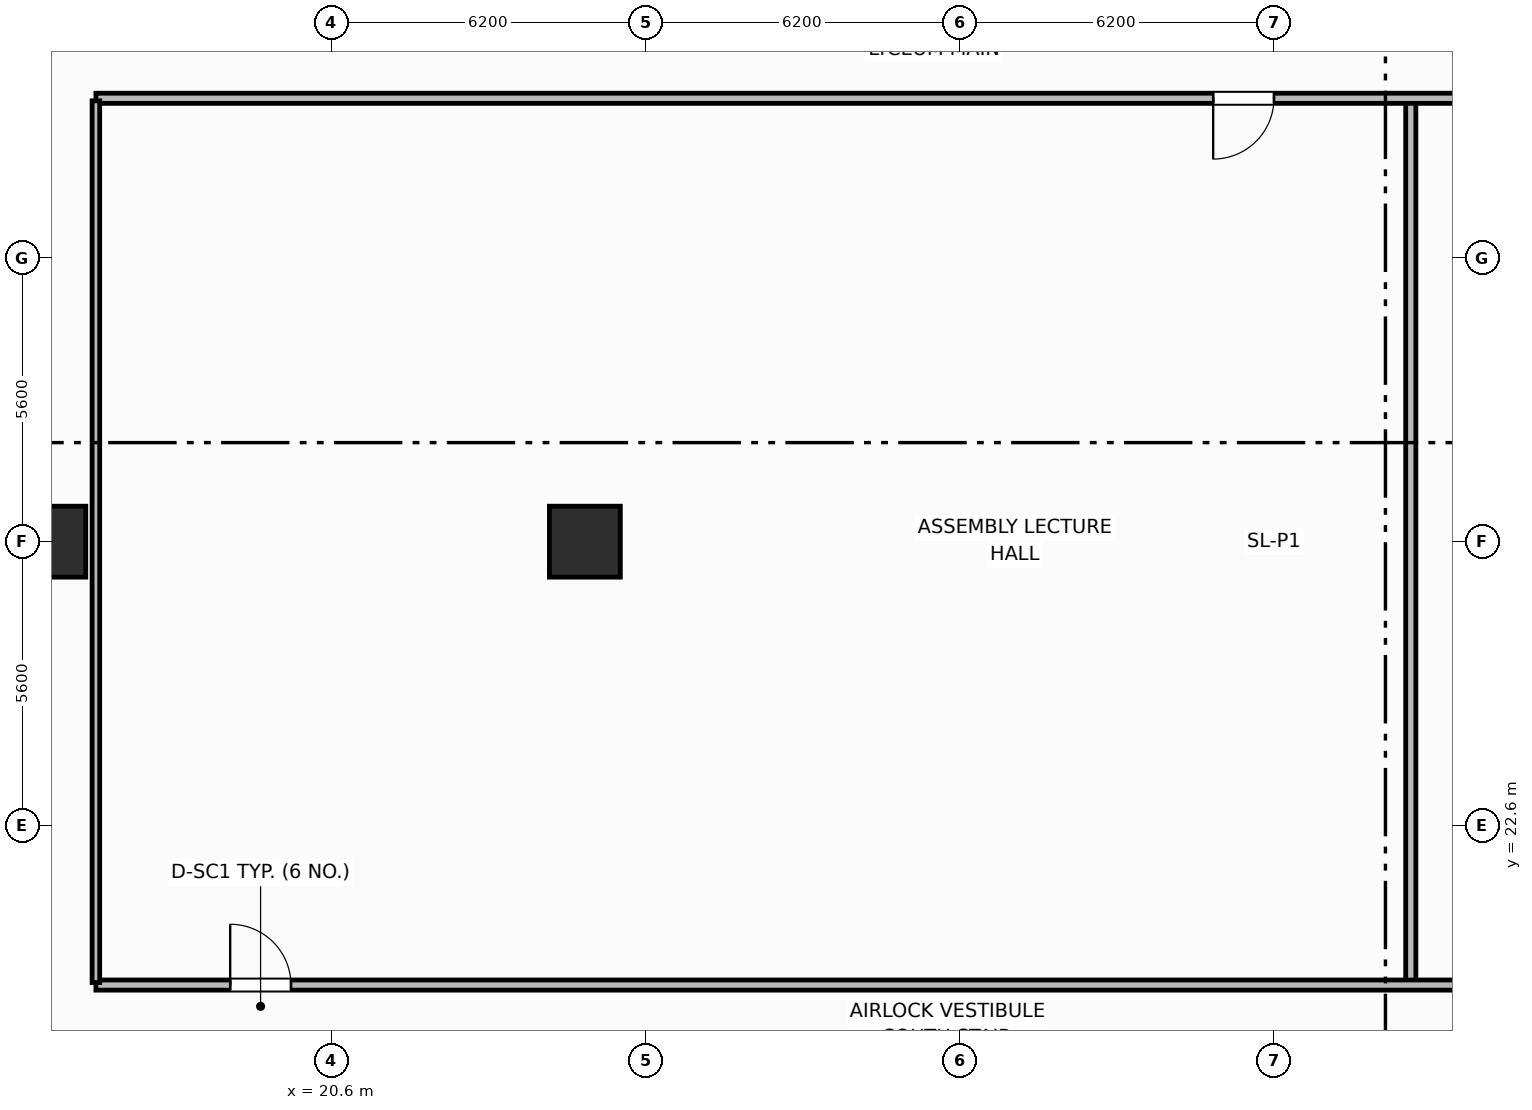
"""IFC4 building model, lengths in metres.
Left out: names, types, materials, properties, quantities, classifications, styles, units other than length and angle.
Written with IfcOpenShell. Run it as: python <this file> out.ifc"""

import sys

from ifc_helpers import new_model, si_unit, direction, frame, frame_2d, origin, origin_2d, place, context, subcontext, project, spatial, rectangle, extrude, element, fill, save


model = new_model("IFC4")
c1 = context("Model", 3, precision=1e-05, world=origin(), true_north=direction((0.0, 1.0)))
c2 = subcontext(c1, "Body", "Model", "MODEL_VIEW")
j1 = project(units=[si_unit("LENGTHUNIT", "METRE"), si_unit("PLANEANGLEUNIT", "RADIAN")], contexts=[c1])
p1 = place(None, origin())
s1 = spatial("IfcSite", under=j1, at=p1, CompositionType="ELEMENT")
p2 = place(p1, origin())
s2 = spatial("IfcBuilding", under=s1, at=p2, CompositionType="ELEMENT")
p3 = place(p2, frame((0.0, 0.0, 11.1)))
s3 = spatial("IfcBuildingStorey", under=s2, at=p3, CompositionType="ELEMENT", Elevation=11.1)
for number, where, z_axis, x_axis in (
    (1, (25.6, 28.2, 0.0), (0.0, 0.0, 1.0), (1.0, 0.0, 0.0)),
    (2, (15.05, 28.2, 0.0), (0.0, 0.0, 1.0), (1.0, 0.0, 0.0)),
):
    element("IfcColumn", number, at=place(p3, frame(where, z_axis=z_axis, x_axis=x_axis)), inside=s3, PredefinedType="COLUMN", context=c2, shape_type="SweptSolid", body=[
        extrude(rectangle(XDim=1.4, YDim=1.4, at=origin_2d()), origin(), (0.0, 0.0, 1.0), 4.5),
    ])
p4 = place(p3, frame((41.9, 19.5, 0.0), z_axis=(0.0, 0.0, 1.0), x_axis=(0.0, 1.0, 0.0)))
e3 = element("IfcWall", 3, at=p4, inside=s3, PredefinedType="PARTITIONING", context=c2, shape_type="SweptSolid", body=[
    extrude(rectangle(XDim=17.4, YDim=0.2, at=frame_2d((8.7, 0.0))), origin(), (0.0, 0.0, 1.0), 3.42),
])
p5 = place(p3, frame((15.95, 19.45, 0.0), z_axis=(0.0, 0.0, 1.0), x_axis=(1.0, 0.0, 0.0)))
e4 = element("IfcWall", 4, at=p5, inside=s3, PredefinedType="PARTITIONING", context=c2, shape_type="SweptSolid", body=[
    extrude(rectangle(XDim=46.5, YDim=0.2, at=frame_2d((23.25, 0.0))), origin(), (0.0, 0.0, 1.0), 3.42),
])
p6 = place(p5, frame((2.65, 0.0, 0.0)))
e5 = element("IfcOpeningElement", 5, at=p6, cuts=e4, PredefinedType="OPENING", context=c2, shape_type="SweptSolid", body=[
    extrude(rectangle(XDim=1.2, YDim=2.15, at=frame_2d((0.6, 1.075))), frame((0.0, 0.11, 0.0), z_axis=(0.0, -1.0, 0.0), x_axis=(1.0, 0.0, 0.0)), (0.0, 0.0, 1.0), 0.22),
])
p7 = place(p5, frame((28.65, 0.0, 0.0)))
e6 = element("IfcOpeningElement", 6, at=p7, cuts=e4, PredefinedType="OPENING", context=c2, shape_type="SweptSolid", body=[
    extrude(rectangle(XDim=1.2, YDim=2.15, at=frame_2d((0.6, 1.075))), frame((0.0, 0.11, 0.0), z_axis=(0.0, -1.0, 0.0), x_axis=(1.0, 0.0, 0.0)), (0.0, 0.0, 1.0), 0.22),
])
p8 = place(p5, frame((39.65, 0.0, 0.0)))
e7 = element("IfcOpeningElement", 7, at=p8, cuts=e4, PredefinedType="OPENING", context=c2, shape_type="SweptSolid", body=[
    extrude(rectangle(XDim=1.2, YDim=2.15, at=frame_2d((0.6, 1.075))), frame((0.0, 0.11, 0.0), z_axis=(0.0, -1.0, 0.0), x_axis=(1.0, 0.0, 0.0)), (0.0, 0.0, 1.0), 0.22),
])
p9 = place(p3, frame((62.45, 36.95, 0.0), z_axis=(0.0, 0.0, 1.0), x_axis=(-1.0, 0.0, 0.0)))
e8 = element("IfcWall", 8, at=p9, inside=s3, PredefinedType="PARTITIONING", context=c2, shape_type="SweptSolid", body=[
    extrude(rectangle(XDim=46.5, YDim=0.2, at=frame_2d((23.25, 0.0))), origin(), (0.0, 0.0, 1.0), 3.42),
])
p10 = place(p9, frame((23.25, 0.0, 0.0)))
e9 = element("IfcOpeningElement", 9, at=p10, cuts=e8, PredefinedType="OPENING", context=c2, shape_type="SweptSolid", body=[
    extrude(rectangle(XDim=1.2, YDim=2.15, at=frame_2d((0.6, 1.075))), frame((0.0, 0.11, 0.0), z_axis=(0.0, -1.0, 0.0), x_axis=(1.0, 0.0, 0.0)), (0.0, 0.0, 1.0), 0.22),
])
p11 = place(p9, frame((12.25, 0.0, 0.0)))
e10 = element("IfcOpeningElement", 10, at=p11, cuts=e8, PredefinedType="OPENING", context=c2, shape_type="SweptSolid", body=[
    extrude(rectangle(XDim=1.2, YDim=2.15, at=frame_2d((0.6, 1.075))), frame((0.0, 0.11, 0.0), z_axis=(0.0, -1.0, 0.0), x_axis=(1.0, 0.0, 0.0)), (0.0, 0.0, 1.0), 0.22),
])
p12 = place(p9, frame((2.65, 0.0, 0.0)))
e11 = element("IfcOpeningElement", 11, at=p12, cuts=e8, PredefinedType="OPENING", context=c2, shape_type="SweptSolid", body=[
    extrude(rectangle(XDim=1.2, YDim=2.15, at=frame_2d((0.6, 1.075))), frame((0.0, 0.11, 0.0), z_axis=(0.0, -1.0, 0.0), x_axis=(1.0, 0.0, 0.0)), (0.0, 0.0, 1.0), 0.22),
])
p13 = place(p3, frame((15.95, 19.5, 0.0), z_axis=(0.0, 0.0, 1.0), x_axis=(0.0, 1.0, 0.0)))
e12 = element("IfcWall", 12, at=p13, inside=s3, PredefinedType="PARTITIONING", context=c2, shape_type="SweptSolid", body=[
    extrude(rectangle(XDim=17.4, YDim=0.15, at=frame_2d((8.7, 0.0))), origin(), (0.0, 0.0, 1.0), 3.42),
])
p14 = place(p6, origin())
e13 = element("IfcDoor", 13, at=p14, inside=s3, OperationType="SINGLE_SWING_LEFT", PredefinedType="DOOR", context=c2, shape_type="SweptSolid", body=[
    extrude(rectangle(XDim=1.2, YDim=2.15, at=frame_2d((0.6, 1.075))), frame((0.0, 0.025, 0.0), z_axis=(0.0, -1.0, 0.0), x_axis=(1.0, 0.0, 0.0)), (0.0, 0.0, 1.0), 0.05),
])
fill(e5, e13)
p15 = place(p10, origin())
e14 = element("IfcDoor", 14, at=p15, inside=s3, OperationType="SINGLE_SWING_RIGHT", PredefinedType="DOOR", context=c2, shape_type="SweptSolid", body=[
    extrude(rectangle(XDim=1.2, YDim=2.15, at=frame_2d((0.6, 1.075))), frame((0.0, 0.025, 0.0), z_axis=(0.0, -1.0, 0.0), x_axis=(1.0, 0.0, 0.0)), (0.0, 0.0, 1.0), 0.05),
])
fill(e9, e14)
save(model, sys.argv[1])
